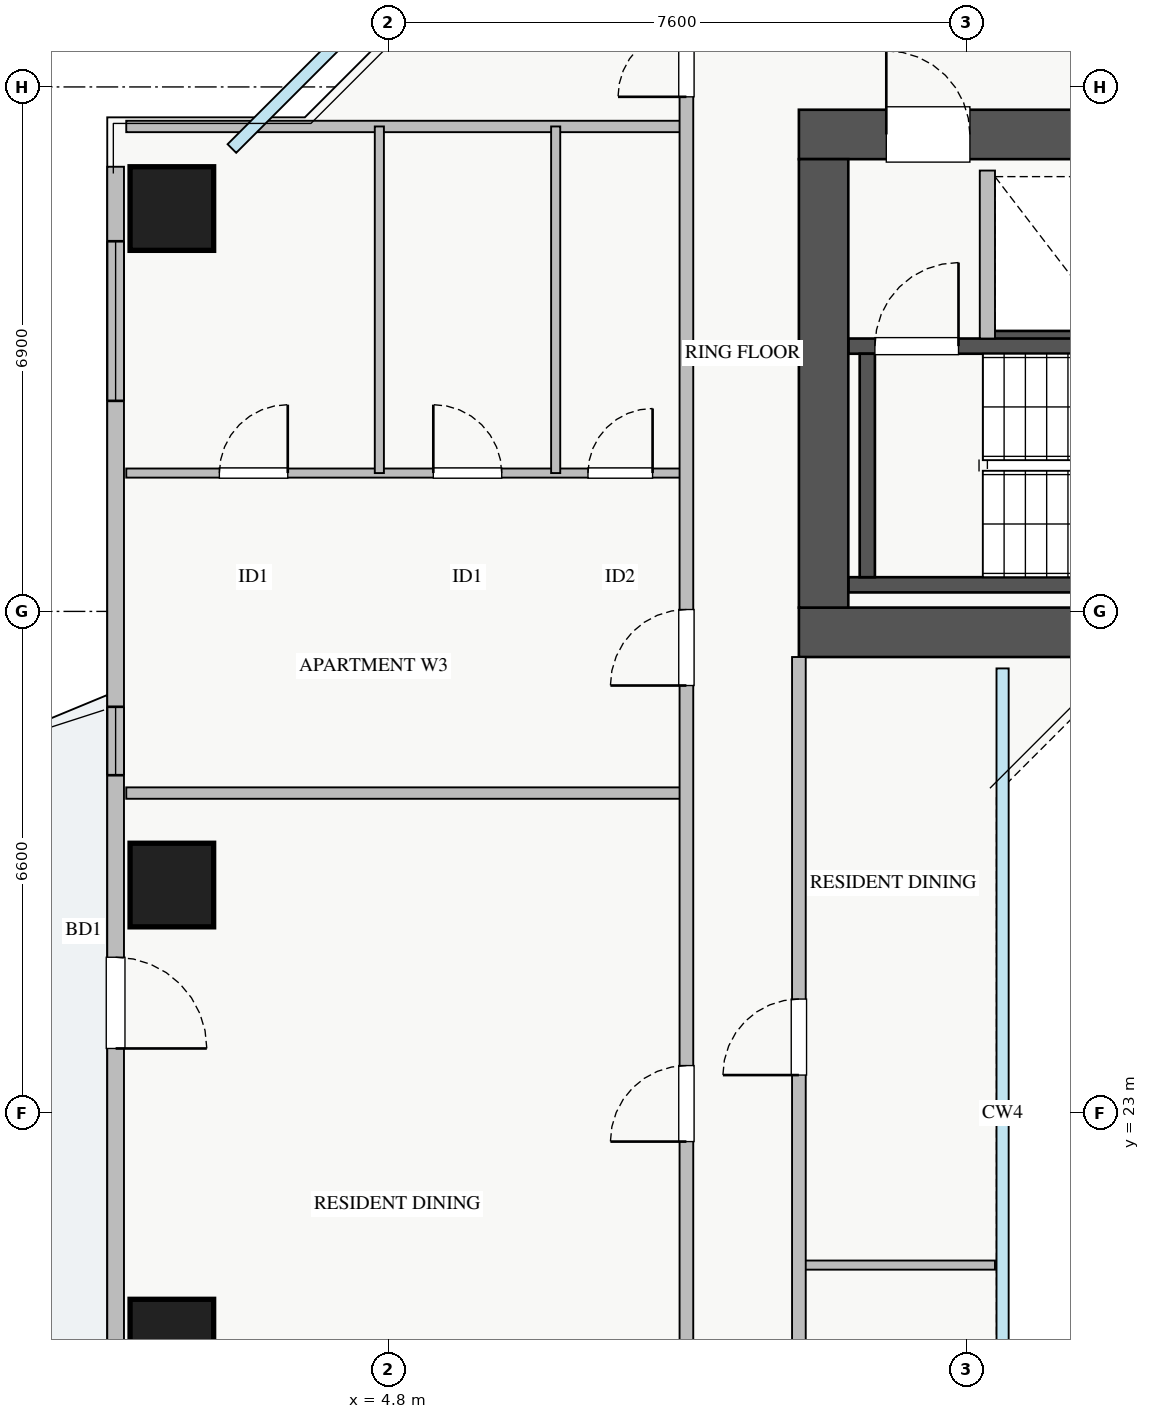
"""IFC4 building model, lengths in metres.
Left out: names, types, materials, properties, quantities, classifications, styles, units other than length and angle.
Written with IfcOpenShell. Run it as: python <this file> out.ifc"""

import sys

from ifc_helpers import new_model, si_unit, direction, frame, frame_2d, origin, origin_2d, place, context, subcontext, project, spatial, rectangle, extrude, source, transform, mapped, element, fill, save


model = new_model("IFC4")
c1 = context("Model", 3, precision=1e-05, world=origin(), true_north=direction((0.0, 1.0)))
c2 = subcontext(c1, "Body", "Model", "MODEL_VIEW")
j1 = project(units=[si_unit("LENGTHUNIT", "METRE"), si_unit("PLANEANGLEUNIT", "RADIAN")], contexts=[c1])
p1 = place(None, origin())
s1 = spatial("IfcSite", under=j1, at=p1, CompositionType="ELEMENT")
p2 = place(p1, origin())
s2 = spatial("IfcBuilding", under=s1, at=p2, CompositionType="ELEMENT")
p3 = place(p2, frame((0.0, 0.0, 129.5)))
s3 = spatial("IfcBuildingStorey", under=s2, at=p3, CompositionType="ELEMENT", Elevation=129.5)
p4 = place(p3, frame((12.68, 33.2, 0.0), z_axis=(0.0, 0.0, 1.0), x_axis=(1.0, 0.0, 0.0)))
e1 = element("IfcWall", 1, at=p4, inside=s3, PredefinedType="SHEAR", context=c2, shape_type="SweptSolid", body=[
    extrude(rectangle(XDim=1.94, YDim=0.18, at=frame_2d((0.97, 0.0))), origin(), (0.0, 0.0, 1.0), 3.07),
])
p5 = place(p3, frame((10.85, 29.95, 0.0), z_axis=(0.0, 0.0, 1.0), x_axis=(1.0, 0.0, 0.0)))
e2 = element("IfcWall", 2, at=p5, inside=s3, PredefinedType="SHEAR", context=c2, shape_type="SweptSolid", body=[
    extrude(rectangle(XDim=7.3, YDim=0.2, at=frame_2d((3.65, 0.0))), origin(), (0.0, 0.0, 1.0), 3.25),
])
p6 = place(p3, frame((10.85, 33.09, 0.0), z_axis=(0.0, 0.0, 1.0), x_axis=(1.0, 0.0, 0.0)))
e3 = element("IfcWall", 3, at=p6, inside=s3, PredefinedType="SHEAR", context=c2, shape_type="SweptSolid", body=[
    extrude(rectangle(XDim=7.3, YDim=0.2, at=frame_2d((3.65, 0.0))), origin(), (0.0, 0.0, 1.0), 3.25),
])
p7 = place(p6, frame((0.35, 0.0, 0.0)))
e4 = element("IfcOpeningElement", 4, at=p7, cuts=e3, PredefinedType="OPENING", context=c2, shape_type="SweptSolid", body=[
    extrude(rectangle(XDim=1.1, YDim=2.05, at=frame_2d((0.55, 1.025))), frame((0.0, 0.11, 0.0), z_axis=(0.0, -1.0, 0.0), x_axis=(1.0, 0.0, 0.0)), (0.0, 0.0, 1.0), 0.22),
])
p8 = place(p3, frame((11.1, 30.05, 0.0), z_axis=(0.0, 0.0, 1.0), x_axis=(0.0, 1.0, 0.0)))
e5 = element("IfcWall", 5, at=p8, inside=s3, PredefinedType="SHEAR", context=c2, shape_type="SweptSolid", body=[
    extrude(rectangle(XDim=2.94, YDim=0.2, at=frame_2d((1.47, 0.0))), origin(), (0.0, 0.0, 1.0), 3.25),
])
p9 = place(p3, frame((10.2, 29.325, 0.0), z_axis=(0.0, 0.0, 1.0), x_axis=(1.0, 0.0, 0.0)))
e6 = element("IfcWall", 6, at=p9, inside=s3, PredefinedType="SHEAR", context=c2, shape_type="SweptSolid", body=[
    extrude(rectangle(XDim=17.6, YDim=0.65, at=frame_2d((8.8, 0.0))), origin(), (0.0, 0.0, 1.0), 3.25),
])
p10 = place(p3, frame((10.2, 35.875, 0.0), z_axis=(0.0, 0.0, 1.0), x_axis=(1.0, 0.0, 0.0)))
e7 = element("IfcWall", 7, at=p10, inside=s3, PredefinedType="SHEAR", context=c2, shape_type="SweptSolid", body=[
    extrude(rectangle(XDim=17.6, YDim=0.65, at=frame_2d((8.8, 0.0))), origin(), (0.0, 0.0, 1.0), 3.25),
])
p11 = place(p10, frame((1.15, 0.0, 0.0)))
e8 = element("IfcOpeningElement", 8, at=p11, cuts=e7, PredefinedType="OPENING", context=c2, shape_type="SweptSolid", body=[
    extrude(rectangle(XDim=1.1, YDim=2.05, at=frame_2d((0.55, 1.025))), frame((0.0, 0.335, 0.0), z_axis=(0.0, -1.0, 0.0), x_axis=(1.0, 0.0, 0.0)), (0.0, 0.0, 1.0), 0.67),
])
p12 = place(p10, frame((8.3, 0.0, 0.0)))
e9 = element("IfcOpeningElement", 9, at=p12, cuts=e7, PredefinedType="OPENING", context=c2, shape_type="SweptSolid", body=[
    extrude(rectangle(XDim=1.1, YDim=2.05, at=frame_2d((0.55, 1.025))), frame((0.0, 0.335, 0.0), z_axis=(0.0, -1.0, 0.0), x_axis=(1.0, 0.0, 0.0)), (0.0, 0.0, 1.0), 0.67),
])
p13 = place(p10, frame((4.9, 0.0, 0.0)))
e10 = element("IfcOpeningElement", 10, at=p13, cuts=e7, PredefinedType="OPENING", context=c2, shape_type="SweptSolid", body=[
    extrude(rectangle(XDim=1.1, YDim=2.05, at=frame_2d((0.55, 1.025))), frame((0.0, 0.335, 0.0), z_axis=(0.0, -1.0, 0.0), x_axis=(1.0, 0.0, 0.0)), (0.0, 0.0, 1.0), 0.67),
])
p14 = place(p10, frame((14.74, 0.0, 0.0)))
e11 = element("IfcOpeningElement", 11, at=p14, cuts=e7, PredefinedType="OPENING", context=c2, shape_type="SweptSolid", body=[
    extrude(rectangle(XDim=1.0, YDim=2.05, at=frame_2d((0.5, 1.025))), frame((0.0, 0.335, 0.0), z_axis=(0.0, -1.0, 0.0), x_axis=(1.0, 0.0, 0.0)), (0.0, 0.0, 1.0), 0.67),
])
p15 = place(p10, frame((10.25, 0.0, 0.0)))
e12 = element("IfcOpeningElement", 12, at=p15, cuts=e7, PredefinedType="OPENING", context=c2, shape_type="SweptSolid", body=[
    extrude(rectangle(XDim=1.0, YDim=2.05, at=frame_2d((0.5, 1.025))), frame((0.0, 0.335, 0.0), z_axis=(0.0, -1.0, 0.0), x_axis=(1.0, 0.0, 0.0)), (0.0, 0.0, 1.0), 0.67),
])
p16 = place(p10, frame((12.7, 0.0, 0.0)))
e13 = element("IfcOpeningElement", 13, at=p16, cuts=e7, PredefinedType="OPENING", context=c2, shape_type="SweptSolid", body=[
    extrude(rectangle(XDim=1.0, YDim=2.05, at=frame_2d((0.5, 1.025))), frame((0.0, 0.335, 0.0), z_axis=(0.0, -1.0, 0.0), x_axis=(1.0, 0.0, 0.0)), (0.0, 0.0, 1.0), 0.67),
])
p17 = place(p3, frame((10.525, 29.65, 0.0), z_axis=(0.0, 0.0, 1.0), x_axis=(0.0, 1.0, 0.0)))
e14 = element("IfcWall", 14, at=p17, inside=s3, PredefinedType="SHEAR", context=c2, shape_type="SweptSolid", body=[
    extrude(rectangle(XDim=5.9, YDim=0.65, at=frame_2d((2.95, 0.0))), origin(), (0.0, 0.0, 1.0), 3.25),
])
m1 = source(origin(), c2, "Body", "SweptSolid", [
    extrude(rectangle(XDim=1.1, YDim=1.1, at=origin_2d()), origin(), (0.0, 0.0, 1.0), 3.25),
])
for number, where, z_axis, x_axis in (
    (15, (1.95, 34.9, 0.0), (0.0, 0.0, 1.0), (1.0, 0.0, 0.0)),
    (16, (1.95, 26.0, 0.0), (0.0, 0.0, 1.0), (1.0, 0.0, 0.0)),
    (17, (1.95, 20.0, 0.0), (0.0, 0.0, 1.0), (1.0, 0.0, 0.0)),
):
    element("IfcColumn", number, at=place(p3, frame(where, z_axis=z_axis, x_axis=x_axis)), inside=s3, PredefinedType="COLUMN", context=c2, shape_type="MappedRepresentation", body=[
        mapped(m1, transform((0.0, 0.0, 0.0), x_axis=(1.0, 0.0, 0.0), y_axis=(0.0, 1.0, 0.0), z_axis=(0.0, 0.0, 1.0), scale=1.0)),
    ])
p18 = place(p3, frame((1.21, 10.55, 0.0), z_axis=(0.0, 0.0, 1.0), x_axis=(0.0, 1.0, 0.0)))
e18 = element("IfcWall", 18, at=p18, inside=s3, PredefinedType="STANDARD", context=c2, shape_type="SweptSolid", body=[
    extrude(rectangle(XDim=24.9, YDim=0.22, at=frame_2d((12.45, 0.0))), origin(), (0.0, 0.0, 1.0), 2.61),
])
p19 = place(p18, frame((13.3, 0.0, 0.0)))
e19 = element("IfcOpeningElement", 19, at=p19, cuts=e18, PredefinedType="OPENING", context=c2, shape_type="SweptSolid", body=[
    extrude(rectangle(XDim=1.2, YDim=2.1, at=frame_2d((0.6, 1.05))), frame((0.0, 0.12, 0.0), z_axis=(0.0, -1.0, 0.0), x_axis=(1.0, 0.0, 0.0)), (0.0, 0.0, 1.0), 0.24),
])
p20 = place(p18, frame((0.625, 0.0, 0.9)))
e20 = element("IfcOpeningElement", 20, at=p20, cuts=e18, PredefinedType="OPENING", context=c2, shape_type="SweptSolid", body=[
    extrude(rectangle(XDim=2.4, YDim=1.5, at=frame_2d((1.2, 0.75))), frame((0.0, 0.12, 0.0), z_axis=(0.0, -1.0, 0.0), x_axis=(1.0, 0.0, 0.0)), (0.0, 0.0, 1.0), 0.24),
])
p21 = place(p18, frame((21.82, 0.0, 0.9)))
e21 = element("IfcOpeningElement", 21, at=p21, cuts=e18, PredefinedType="OPENING", context=c2, shape_type="SweptSolid", body=[
    extrude(rectangle(XDim=2.1, YDim=1.5, at=frame_2d((1.05, 0.75))), frame((0.0, 0.12, 0.0), z_axis=(0.0, -1.0, 0.0), x_axis=(1.0, 0.0, 0.0)), (0.0, 0.0, 1.0), 0.24),
])
p22 = place(p18, frame((4.847, 0.0, 0.9)))
e22 = element("IfcOpeningElement", 22, at=p22, cuts=e18, PredefinedType="OPENING", context=c2, shape_type="SweptSolid", body=[
    extrude(rectangle(XDim=2.4, YDim=1.5, at=frame_2d((1.2, 0.75))), frame((0.0, 0.12, 0.0), z_axis=(0.0, -1.0, 0.0), x_axis=(1.0, 0.0, 0.0)), (0.0, 0.0, 1.0), 0.24),
])
p23 = place(p18, frame((16.895, 0.0, 0.9)))
e23 = element("IfcOpeningElement", 23, at=p23, cuts=e18, PredefinedType="OPENING", context=c2, shape_type="SweptSolid", body=[
    extrude(rectangle(XDim=0.9, YDim=1.2, at=frame_2d((0.45, 0.6))), frame((0.0, 0.12, 0.0), z_axis=(0.0, -1.0, 0.0), x_axis=(1.0, 0.0, 0.0)), (0.0, 0.0, 1.0), 0.24),
])
p24 = place(p3, frame((12.68, 33.19, 0.0), z_axis=(0.0, 0.0, 1.0), x_axis=(0.0, 1.0, 0.0)))
e24 = element("IfcWall", 24, at=p24, inside=s3, PredefinedType="PARTITIONING", context=c2, shape_type="SweptSolid", body=[
    extrude(rectangle(XDim=2.21, YDim=0.2, at=frame_2d((1.105, 0.0))), origin(), (0.0, 0.0, 1.0), 3.07),
])
p25 = place(p3, frame((1.35, 35.98, 0.0), z_axis=(0.0, 0.0, 1.0), x_axis=(1.0, 0.0, 0.0)))
e25 = element("IfcWall", 25, at=p25, inside=s3, PredefinedType="PARTITIONING", context=c2, shape_type="SweptSolid", body=[
    extrude(rectangle(XDim=7.37, YDim=0.15, at=frame_2d((3.685, 0.0))), origin(), (0.0, 0.0, 1.0), 3.07),
])
p26 = place(p3, frame((1.35, 31.42, 0.0), z_axis=(0.0, 0.0, 1.0), x_axis=(1.0, 0.0, 0.0)))
e26 = element("IfcWall", 26, at=p26, inside=s3, PredefinedType="PLUMBINGWALL", context=c2, shape_type="SweptSolid", body=[
    extrude(rectangle(XDim=7.37, YDim=0.12, at=frame_2d((3.685, 0.0))), origin(), (0.0, 0.0, 1.0), 3.07),
])
p27 = place(p26, frame((1.225, 0.0, 0.0)))
e27 = element("IfcOpeningElement", 27, at=p27, cuts=e26, PredefinedType="OPENING", context=c2, shape_type="SweptSolid", body=[
    extrude(rectangle(XDim=0.9, YDim=2.05, at=frame_2d((0.45, 1.025))), frame((0.0, 0.07, 0.0), z_axis=(0.0, -1.0, 0.0), x_axis=(1.0, 0.0, 0.0)), (0.0, 0.0, 1.0), 0.14),
])
p28 = place(p26, frame((4.04, 0.0, 0.0)))
e28 = element("IfcOpeningElement", 28, at=p28, cuts=e26, PredefinedType="OPENING", context=c2, shape_type="SweptSolid", body=[
    extrude(rectangle(XDim=0.9, YDim=2.05, at=frame_2d((0.45, 1.025))), frame((0.0, 0.07, 0.0), z_axis=(0.0, -1.0, 0.0), x_axis=(1.0, 0.0, 0.0)), (0.0, 0.0, 1.0), 0.14),
])
p29 = place(p26, frame((6.075, 0.0, 0.0)))
e29 = element("IfcOpeningElement", 29, at=p29, cuts=e26, PredefinedType="OPENING", context=c2, shape_type="SweptSolid", body=[
    extrude(rectangle(XDim=0.85, YDim=2.05, at=frame_2d((0.425, 1.025))), frame((0.0, 0.07, 0.0), z_axis=(0.0, -1.0, 0.0), x_axis=(1.0, 0.0, 0.0)), (0.0, 0.0, 1.0), 0.14),
])
p30 = place(p3, frame((4.68, 31.42, 0.0), z_axis=(0.0, 0.0, 1.0), x_axis=(0.0, 1.0, 0.0)))
e30 = element("IfcWall", 30, at=p30, inside=s3, PredefinedType="PLUMBINGWALL", context=c2, shape_type="SweptSolid", body=[
    extrude(rectangle(XDim=4.56, YDim=0.12, at=frame_2d((2.28, 0.0))), origin(), (0.0, 0.0, 1.0), 3.07),
])
p31 = place(p3, frame((7.0, 31.42, 0.0), z_axis=(0.0, 0.0, 1.0), x_axis=(0.0, 1.0, 0.0)))
e31 = element("IfcWall", 31, at=p31, inside=s3, PredefinedType="PLUMBINGWALL", context=c2, shape_type="SweptSolid", body=[
    extrude(rectangle(XDim=4.56, YDim=0.12, at=frame_2d((2.28, 0.0))), origin(), (0.0, 0.0, 1.0), 2.577),
])
p32 = place(p3, frame((1.35, 27.21, 0.0), z_axis=(0.0, 0.0, 1.0), x_axis=(1.0, 0.0, 0.0)))
e32 = element("IfcWall", 32, at=p32, inside=s3, PredefinedType="PARTITIONING", context=c2, shape_type="SweptSolid", body=[
    extrude(rectangle(XDim=7.37, YDim=0.15, at=frame_2d((3.685, 0.0))), origin(), (0.0, 0.0, 1.0), 3.07),
])
p33 = place(p3, frame((8.72, 8.31, 0.0), z_axis=(0.0, 0.0, 1.0), x_axis=(0.0, 1.0, 0.0)))
e33 = element("IfcWall", 33, at=p33, inside=s3, PredefinedType="PARTITIONING", context=c2, shape_type="SweptSolid", body=[
    extrude(rectangle(XDim=29.37, YDim=0.18, at=frame_2d((14.685, 0.0))), origin(), (0.0, 0.0, 1.0), 3.07),
])
p34 = place(p33, frame((28.06, 0.0, 0.0)))
e34 = element("IfcOpeningElement", 34, at=p34, cuts=e33, PredefinedType="OPENING", context=c2, shape_type="SweptSolid", body=[
    extrude(rectangle(XDim=0.9, YDim=2.05, at=frame_2d((0.45, 1.025))), frame((0.0, 0.1, 0.0), z_axis=(0.0, -1.0, 0.0), x_axis=(1.0, 0.0, 0.0)), (0.0, 0.0, 1.0), 0.2),
])
p35 = place(p33, frame((0.24, 0.0, 0.0)))
e35 = element("IfcOpeningElement", 35, at=p35, cuts=e33, PredefinedType="OPENING", context=c2, shape_type="SweptSolid", body=[
    extrude(rectangle(XDim=0.9, YDim=2.05, at=frame_2d((0.45, 1.025))), frame((0.0, 0.1, 0.0), z_axis=(0.0, -1.0, 0.0), x_axis=(1.0, 0.0, 0.0)), (0.0, 0.0, 1.0), 0.2),
])
p36 = place(p33, frame((2.92, 0.0, 0.0)))
e36 = element("IfcOpeningElement", 36, at=p36, cuts=e33, PredefinedType="OPENING", context=c2, shape_type="SweptSolid", body=[
    extrude(rectangle(XDim=1.0, YDim=2.05, at=frame_2d((0.5, 1.025))), frame((0.0, 0.1, 0.0), z_axis=(0.0, -1.0, 0.0), x_axis=(1.0, 0.0, 0.0)), (0.0, 0.0, 1.0), 0.2),
])
p37 = place(p33, frame((14.315, 0.0, 0.0)))
e37 = element("IfcOpeningElement", 37, at=p37, cuts=e33, PredefinedType="OPENING", context=c2, shape_type="SweptSolid", body=[
    extrude(rectangle(XDim=1.0, YDim=2.05, at=frame_2d((0.5, 1.025))), frame((0.0, 0.1, 0.0), z_axis=(0.0, -1.0, 0.0), x_axis=(1.0, 0.0, 0.0)), (0.0, 0.0, 1.0), 0.2),
])
p38 = place(p33, frame((20.315, 0.0, 0.0)))
e38 = element("IfcOpeningElement", 38, at=p38, cuts=e33, PredefinedType="OPENING", context=c2, shape_type="SweptSolid", body=[
    extrude(rectangle(XDim=1.0, YDim=2.05, at=frame_2d((0.5, 1.025))), frame((0.0, 0.1, 0.0), z_axis=(0.0, -1.0, 0.0), x_axis=(1.0, 0.0, 0.0)), (0.0, 0.0, 1.0), 0.2),
])
p39 = place(p3, frame((10.2, 21.0, 0.0), z_axis=(0.0, 0.0, 1.0), x_axis=(1.0, 0.0, 0.0)))
e39 = element("IfcWall", 39, at=p39, inside=s3, PredefinedType="PLUMBINGWALL", context=c2, shape_type="SweptSolid", body=[
    extrude(rectangle(XDim=2.58, YDim=0.12, at=frame_2d((1.29, 0.0))), origin(), (0.0, 0.0, 1.0), 3.07),
])
p40 = place(p3, frame((10.2, 17.0, 0.0), z_axis=(0.0, 0.0, 1.0), x_axis=(0.0, 1.0, 0.0)))
e40 = element("IfcWall", 40, at=p40, inside=s3, PredefinedType="PARTITIONING", context=c2, shape_type="SweptSolid", body=[
    extrude(rectangle(XDim=12.0, YDim=0.18, at=frame_2d((6.0, 0.0))), origin(), (0.0, 0.0, 1.0), 3.07),
])
p41 = place(p40, frame((1.5, 0.0, 0.0)))
e41 = element("IfcOpeningElement", 41, at=p41, cuts=e40, PredefinedType="OPENING", context=c2, shape_type="SweptSolid", body=[
    extrude(rectangle(XDim=0.85, YDim=2.05, at=frame_2d((0.425, 1.025))), frame((0.0, 0.1, 0.0), z_axis=(0.0, -1.0, 0.0), x_axis=(1.0, 0.0, 0.0)), (0.0, 0.0, 1.0), 0.2),
])
p42 = place(p40, frame((6.5, 0.0, 0.0)))
e42 = element("IfcOpeningElement", 42, at=p42, cuts=e40, PredefinedType="OPENING", context=c2, shape_type="SweptSolid", body=[
    extrude(rectangle(XDim=1.0, YDim=2.05, at=frame_2d((0.5, 1.025))), frame((0.0, 0.1, 0.0), z_axis=(0.0, -1.0, 0.0), x_axis=(1.0, 0.0, 0.0)), (0.0, 0.0, 1.0), 0.2),
])
m2 = source(origin(), c2, "Body", "SweptSolid", [
    extrude(rectangle(XDim=1.2, YDim=2.1, at=frame_2d((0.6, 1.05))), frame((0.0, 0.025, 0.0), z_axis=(0.0, -1.0, 0.0), x_axis=(1.0, 0.0, 0.0)), (0.0, 0.0, 1.0), 0.05),
])
p43 = place(p19, frame((1.2, 0.0, 0.0), z_axis=(0.0, 0.0, 1.0), x_axis=(-1.0, 0.0, 0.0)))
e43 = element("IfcDoor", 43, at=p43, inside=s3, OperationType="SINGLE_SWING_LEFT", PredefinedType="DOOR", context=c2, shape_type="MappedRepresentation", body=[
    mapped(m2, transform((0.0, 0.0, 0.0), x_axis=(1.0, 0.0, 0.0), y_axis=(0.0, 1.0, 0.0), z_axis=(0.0, 0.0, 1.0), scale=1.0)),
])
fill(e19, e43)
m3 = source(origin(), c2, "Body", "SweptSolid", [
    extrude(rectangle(XDim=2.1, YDim=1.5, at=frame_2d((1.05, 0.75))), frame((0.0, 0.03, 0.0), z_axis=(0.0, -1.0, 0.0), x_axis=(1.0, 0.0, 0.0)), (0.0, 0.0, 1.0), 0.06),
])
p44 = place(p21, origin())
e44 = element("IfcWindow", 44, at=p44, inside=s3, PartitioningType="TRIPLE_PANEL_VERTICAL", PredefinedType="WINDOW", context=c2, shape_type="MappedRepresentation", body=[
    mapped(m3, transform((0.0, 0.0, 0.0), x_axis=(1.0, 0.0, 0.0), y_axis=(0.0, 1.0, 0.0), z_axis=(0.0, 0.0, 1.0), scale=1.0)),
])
fill(e21, e44)
m4 = source(origin(), c2, "Body", "SweptSolid", [
    extrude(rectangle(XDim=1.1, YDim=2.05, at=frame_2d((0.55, 1.025))), frame((0.0, 0.025, 0.0), z_axis=(0.0, -1.0, 0.0), x_axis=(1.0, 0.0, 0.0)), (0.0, 0.0, 1.0), 0.05),
])
p45 = place(p11, origin())
e45 = element("IfcDoor", 45, at=p45, inside=s3, OperationType="SINGLE_SWING_LEFT", PredefinedType="DOOR", context=c2, shape_type="MappedRepresentation", body=[
    mapped(m4, transform((0.0, 0.0, 0.0), x_axis=(1.0, 0.0, 0.0), y_axis=(0.0, 1.0, 0.0), z_axis=(0.0, 0.0, 1.0), scale=1.0)),
])
fill(e8, e45)
p46 = place(p7, origin())
e46 = element("IfcDoor", 46, at=p46, inside=s3, OperationType="SINGLE_SWING_RIGHT", PredefinedType="DOOR", context=c2, shape_type="MappedRepresentation", body=[
    mapped(m4, transform((0.0, 0.0, 0.0), x_axis=(1.0, 0.0, 0.0), y_axis=(0.0, 1.0, 0.0), z_axis=(0.0, 0.0, 1.0), scale=1.0)),
])
fill(e4, e46)
m5 = source(origin(), c2, "Body", "SweptSolid", [
    extrude(rectangle(XDim=0.9, YDim=2.05, at=frame_2d((0.45, 1.025))), frame((0.0, 0.025, 0.0), z_axis=(0.0, -1.0, 0.0), x_axis=(1.0, 0.0, 0.0)), (0.0, 0.0, 1.0), 0.05),
])
p47 = place(p27, origin())
e47 = element("IfcDoor", 47, at=p47, inside=s3, OperationType="SINGLE_SWING_RIGHT", PredefinedType="DOOR", context=c2, shape_type="MappedRepresentation", body=[
    mapped(m5, transform((0.0, 0.0, 0.0), x_axis=(1.0, 0.0, 0.0), y_axis=(0.0, 1.0, 0.0), z_axis=(0.0, 0.0, 1.0), scale=1.0)),
])
fill(e27, e47)
p48 = place(p28, origin())
e48 = element("IfcDoor", 48, at=p48, inside=s3, OperationType="SINGLE_SWING_LEFT", PredefinedType="DOOR", context=c2, shape_type="MappedRepresentation", body=[
    mapped(m5, transform((0.0, 0.0, 0.0), x_axis=(1.0, 0.0, 0.0), y_axis=(0.0, 1.0, 0.0), z_axis=(0.0, 0.0, 1.0), scale=1.0)),
])
fill(e28, e48)
m6 = source(origin(), c2, "Body", "SweptSolid", [
    extrude(rectangle(XDim=0.85, YDim=2.05, at=frame_2d((0.425, 1.025))), frame((0.0, 0.025, 0.0), z_axis=(0.0, -1.0, 0.0), x_axis=(1.0, 0.0, 0.0)), (0.0, 0.0, 1.0), 0.05),
])
p49 = place(p29, origin())
e49 = element("IfcDoor", 49, at=p49, inside=s3, OperationType="SINGLE_SWING_RIGHT", PredefinedType="DOOR", context=c2, shape_type="MappedRepresentation", body=[
    mapped(m6, transform((0.0, 0.0, 0.0), x_axis=(1.0, 0.0, 0.0), y_axis=(0.0, 1.0, 0.0), z_axis=(0.0, 0.0, 1.0), scale=1.0)),
])
fill(e29, e49)
p50 = place(p34, origin())
e50 = element("IfcDoor", 50, at=p50, inside=s3, OperationType="SINGLE_SWING_LEFT", PredefinedType="DOOR", context=c2, shape_type="MappedRepresentation", body=[
    mapped(m5, transform((0.0, 0.0, 0.0), x_axis=(1.0, 0.0, 0.0), y_axis=(0.0, 1.0, 0.0), z_axis=(0.0, 0.0, 1.0), scale=1.0)),
])
fill(e34, e50)
m7 = source(origin(), c2, "Body", "SweptSolid", [
    extrude(rectangle(XDim=1.0, YDim=2.05, at=frame_2d((0.5, 1.025))), frame((0.0, 0.025, 0.0), z_axis=(0.0, -1.0, 0.0), x_axis=(1.0, 0.0, 0.0)), (0.0, 0.0, 1.0), 0.05),
])
p51 = place(p37, origin())
e51 = element("IfcDoor", 51, at=p51, inside=s3, OperationType="SINGLE_SWING_LEFT", PredefinedType="DOOR", context=c2, shape_type="MappedRepresentation", body=[
    mapped(m7, transform((0.0, 0.0, 0.0), x_axis=(1.0, 0.0, 0.0), y_axis=(0.0, 1.0, 0.0), z_axis=(0.0, 0.0, 1.0), scale=1.0)),
])
fill(e37, e51)
p52 = place(p38, origin())
e52 = element("IfcDoor", 52, at=p52, inside=s3, OperationType="SINGLE_SWING_LEFT", PredefinedType="DOOR", context=c2, shape_type="MappedRepresentation", body=[
    mapped(m7, transform((0.0, 0.0, 0.0), x_axis=(1.0, 0.0, 0.0), y_axis=(0.0, 1.0, 0.0), z_axis=(0.0, 0.0, 1.0), scale=1.0)),
])
fill(e38, e52)
p53 = place(p42, origin())
e53 = element("IfcDoor", 53, at=p53, inside=s3, OperationType="SINGLE_SWING_LEFT", PredefinedType="DOOR", context=c2, shape_type="MappedRepresentation", body=[
    mapped(m7, transform((0.0, 0.0, 0.0), x_axis=(1.0, 0.0, 0.0), y_axis=(0.0, 1.0, 0.0), z_axis=(0.0, 0.0, 1.0), scale=1.0)),
])
fill(e42, e53)
m8 = source(origin(), c2, "Body", "SweptSolid", [
    extrude(rectangle(XDim=0.9, YDim=1.2, at=frame_2d((0.45, 0.6))), frame((0.0, 0.03, 0.0), z_axis=(0.0, -1.0, 0.0), x_axis=(1.0, 0.0, 0.0)), (0.0, 0.0, 1.0), 0.06),
])
p54 = place(p23, origin())
e54 = element("IfcWindow", 54, at=p54, inside=s3, PartitioningType="SINGLE_PANEL", PredefinedType="WINDOW", context=c2, shape_type="MappedRepresentation", body=[
    mapped(m8, transform((0.0, 0.0, 0.0), x_axis=(1.0, 0.0, 0.0), y_axis=(0.0, 1.0, 0.0), z_axis=(0.0, 0.0, 1.0), scale=1.0)),
])
fill(e23, e54)
save(model, sys.argv[1])
